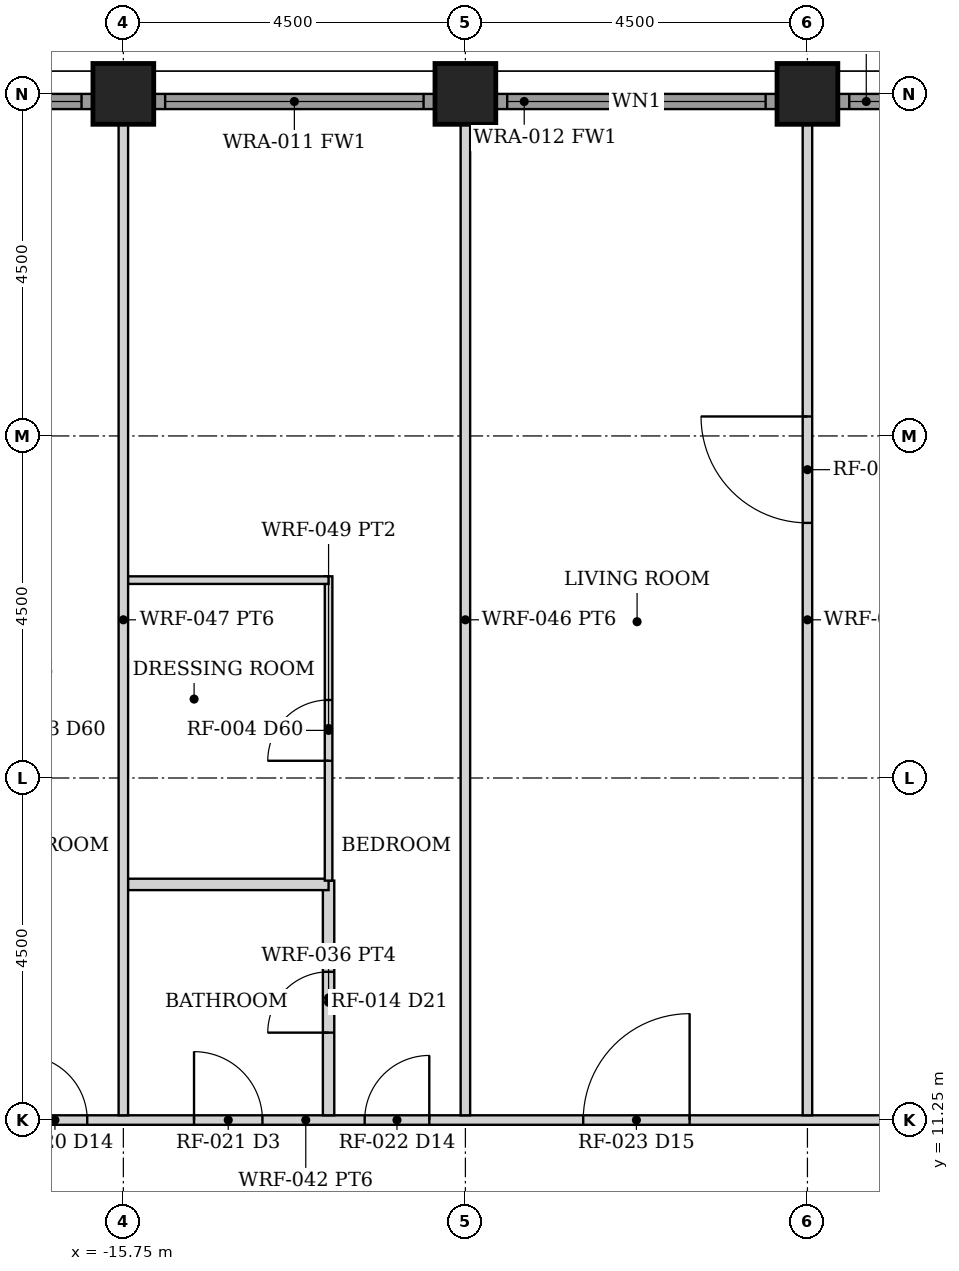
"""IFC4 building model, lengths in metres.
Left out: names, types, materials, properties, quantities, classifications, styles, units other than length and angle.
Written with IfcOpenShell. Run it as: python <this file> out.ifc"""

import sys

from ifc_helpers import new_model, si_unit, direction, frame, frame_2d, origin, origin_2d, place, context, subcontext, project, spatial, rectangle, hollow_rectangle, extrude, element, fill, save


model = new_model("IFC4")
c1 = context("Model", 3, precision=1e-05, world=origin(), true_north=direction((0.0, 1.0)))
c2 = subcontext(c1, "Body", "Model", "MODEL_VIEW")
j1 = project(units=[si_unit("LENGTHUNIT", "METRE"), si_unit("PLANEANGLEUNIT", "RADIAN")], contexts=[c1])
p1 = place(None, origin())
s1 = spatial("IfcSite", under=j1, at=p1, CompositionType="ELEMENT")
p2 = place(p1, origin())
s2 = spatial("IfcBuilding", under=s1, at=p2, CompositionType="ELEMENT")
p3 = place(p2, frame((0.0, 0.0, 79.0)))
s3 = spatial("IfcBuildingStorey", under=s2, at=p3, CompositionType="ELEMENT", Elevation=79.0)
for number, where, z_axis, x_axis in (
    (1, (-15.75, 24.75, 0.0), (0.0, 0.0, 1.0), (0.0, 1.0, 0.0)),
    (2, (-11.25, 24.75, 0.0), (0.0, 0.0, 1.0), (0.0, 1.0, 0.0)),
    (3, (-6.75, 24.75, 0.0), (0.0, 0.0, 1.0), (0.0, 1.0, 0.0)),
):
    element("IfcColumn", number, at=place(p3, frame(where, z_axis=z_axis, x_axis=x_axis)), inside=s3, PredefinedType="COLUMN", context=c2, shape_type="SweptSolid", body=[
        extrude(hollow_rectangle(XDim=0.8, YDim=0.8, WallThickness=0.06, at=origin_2d()), origin(), (0.0, 0.0, 1.0), 3.5),
    ])
p4 = place(p3, frame((-19.845, 24.65, 0.0), z_axis=(0.0, 0.0, 1.0), x_axis=(1.0, 0.0, 0.0)))
e4 = element("IfcWall", 4, at=p4, inside=s3, PredefinedType="SOLIDWALL", context=c2, shape_type="SweptSolid", body=[
    extrude(rectangle(XDim=3.69, YDim=0.2, at=frame_2d((1.845, 0.0))), origin(), (0.0, 0.0, 1.0), 2.379),
])
p5 = place(p4, frame((0.145, 0.0, 0.3)))
e5 = element("IfcOpeningElement", 5, at=p5, cuts=e4, PredefinedType="OPENING", context=c2, shape_type="SweptSolid", body=[
    extrude(rectangle(XDim=3.4, YDim=1.929, at=frame_2d((1.7, 0.964))), frame((0.0, 0.11, 0.0), z_axis=(0.0, -1.0, 0.0), x_axis=(1.0, 0.0, 0.0)), (0.0, 0.0, 1.0), 0.22),
])
p6 = place(p3, frame((-15.345, 24.65, 0.0), z_axis=(0.0, 0.0, 1.0), x_axis=(1.0, 0.0, 0.0)))
e6 = element("IfcWall", 6, at=p6, inside=s3, PredefinedType="SOLIDWALL", context=c2, shape_type="SweptSolid", body=[
    extrude(rectangle(XDim=3.69, YDim=0.2, at=frame_2d((1.845, 0.0))), origin(), (0.0, 0.0, 1.0), 2.379),
])
p7 = place(p6, frame((0.145, 0.0, 0.3)))
e7 = element("IfcOpeningElement", 7, at=p7, cuts=e6, PredefinedType="OPENING", context=c2, shape_type="SweptSolid", body=[
    extrude(rectangle(XDim=3.4, YDim=1.929, at=frame_2d((1.7, 0.964))), frame((0.0, 0.11, 0.0), z_axis=(0.0, -1.0, 0.0), x_axis=(1.0, 0.0, 0.0)), (0.0, 0.0, 1.0), 0.22),
])
p8 = place(p3, frame((-10.845, 24.65, 0.0), z_axis=(0.0, 0.0, 1.0), x_axis=(1.0, 0.0, 0.0)))
e8 = element("IfcWall", 8, at=p8, inside=s3, PredefinedType="SOLIDWALL", context=c2, shape_type="SweptSolid", body=[
    extrude(rectangle(XDim=3.69, YDim=0.2, at=frame_2d((1.845, 0.0))), origin(), (0.0, 0.0, 1.0), 2.379),
])
p9 = place(p8, frame((0.145, 0.0, 0.3)))
e9 = element("IfcOpeningElement", 9, at=p9, cuts=e8, PredefinedType="OPENING", context=c2, shape_type="SweptSolid", body=[
    extrude(rectangle(XDim=3.4, YDim=1.929, at=frame_2d((1.7, 0.964))), frame((0.0, 0.11, 0.0), z_axis=(0.0, -1.0, 0.0), x_axis=(1.0, 0.0, 0.0)), (0.0, 0.0, 1.0), 0.22),
])
p10 = place(p3, frame((-6.345, 24.65, 0.0), z_axis=(0.0, 0.0, 1.0), x_axis=(1.0, 0.0, 0.0)))
e10 = element("IfcWall", 10, at=p10, inside=s3, PredefinedType="SOLIDWALL", context=c2, shape_type="SweptSolid", body=[
    extrude(rectangle(XDim=3.69, YDim=0.2, at=frame_2d((1.845, 0.0))), origin(), (0.0, 0.0, 1.0), 2.379),
])
p11 = place(p10, frame((0.145, 0.0, 0.3)))
e11 = element("IfcOpeningElement", 11, at=p11, cuts=e10, PredefinedType="OPENING", context=c2, shape_type="SweptSolid", body=[
    extrude(rectangle(XDim=3.4, YDim=1.929, at=frame_2d((1.7, 0.964))), frame((0.0, 0.11, 0.0), z_axis=(0.0, -1.0, 0.0), x_axis=(1.0, 0.0, 0.0)), (0.0, 0.0, 1.0), 0.22),
])
p12 = place(p3, frame((-24.35, 11.25, 0.0), z_axis=(0.0, 0.0, 1.0), x_axis=(1.0, 0.0, 0.0)))
e12 = element("IfcWall", 12, at=p12, inside=s3, PredefinedType="PARTITIONING", context=c2, shape_type="SweptSolid", body=[
    extrude(rectangle(XDim=22.0, YDim=0.125, at=frame_2d((11.0, 0.0))), origin(), (0.0, 0.0, 1.0), 2.373),
])
p13 = place(p12, frame((20.25, 0.0, 0.0)))
e13 = element("IfcOpeningElement", 13, at=p13, cuts=e12, PredefinedType="OPENING", context=c2, shape_type="SweptSolid", body=[
    extrude(rectangle(XDim=0.9, YDim=2.1, at=frame_2d((0.45, 1.05))), frame((0.0, 0.073, 0.0), z_axis=(0.0, -1.0, 0.0), x_axis=(1.0, 0.0, 0.0)), (0.0, 0.0, 1.0), 0.145),
])
p14 = place(p12, frame((14.65, 0.0, 0.0)))
e14 = element("IfcOpeningElement", 14, at=p14, cuts=e12, PredefinedType="OPENING", context=c2, shape_type="SweptSolid", body=[
    extrude(rectangle(XDim=1.4, YDim=2.1, at=frame_2d((0.7, 1.05))), frame((0.0, 0.073, 0.0), z_axis=(0.0, -1.0, 0.0), x_axis=(1.0, 0.0, 0.0)), (0.0, 0.0, 1.0), 0.145),
])
p15 = place(p12, frame((11.775, 0.0, 0.0)))
e15 = element("IfcOpeningElement", 15, at=p15, cuts=e12, PredefinedType="OPENING", context=c2, shape_type="SweptSolid", body=[
    extrude(rectangle(XDim=0.85, YDim=2.1, at=frame_2d((0.425, 1.05))), frame((0.0, 0.073, 0.0), z_axis=(0.0, -1.0, 0.0), x_axis=(1.0, 0.0, 0.0)), (0.0, 0.0, 1.0), 0.145),
])
p16 = place(p12, frame((9.53, 0.0, 0.0)))
e16 = element("IfcOpeningElement", 16, at=p16, cuts=e12, PredefinedType="OPENING", context=c2, shape_type="SweptSolid", body=[
    extrude(rectangle(XDim=0.9, YDim=2.1, at=frame_2d((0.45, 1.05))), frame((0.0, 0.073, 0.0), z_axis=(0.0, -1.0, 0.0), x_axis=(1.0, 0.0, 0.0)), (0.0, 0.0, 1.0), 0.145),
])
p17 = place(p12, frame((7.275, 0.0, 0.0)))
e17 = element("IfcOpeningElement", 17, at=p17, cuts=e12, PredefinedType="OPENING", context=c2, shape_type="SweptSolid", body=[
    extrude(rectangle(XDim=0.85, YDim=2.1, at=frame_2d((0.425, 1.05))), frame((0.0, 0.073, 0.0), z_axis=(0.0, -1.0, 0.0), x_axis=(1.0, 0.0, 0.0)), (0.0, 0.0, 1.0), 0.145),
])
p18 = place(p12, frame((2.775, 0.0, 0.0)))
e18 = element("IfcOpeningElement", 18, at=p18, cuts=e12, PredefinedType="OPENING", context=c2, shape_type="SweptSolid", body=[
    extrude(rectangle(XDim=0.85, YDim=2.1, at=frame_2d((0.425, 1.05))), frame((0.0, 0.073, 0.0), z_axis=(0.0, -1.0, 0.0), x_axis=(1.0, 0.0, 0.0)), (0.0, 0.0, 1.0), 0.145),
])
p19 = place(p3, frame((-6.75, 11.312, 0.0), z_axis=(0.0, 0.0, 1.0), x_axis=(0.0, 1.0, 0.0)))
e19 = element("IfcWall", 19, at=p19, inside=s3, PredefinedType="PARTITIONING", context=c2, shape_type="SweptSolid", body=[
    extrude(rectangle(XDim=13.038, YDim=0.125, at=frame_2d((6.519, 0.0))), origin(), (0.0, 0.0, 1.0), 2.373),
])
p20 = place(p19, frame((7.794, 0.0, 0.0)))
e20 = element("IfcOpeningElement", 20, at=p20, cuts=e19, PredefinedType="OPENING", context=c2, shape_type="SweptSolid", body=[
    extrude(rectangle(XDim=1.4, YDim=2.1, at=frame_2d((0.7, 1.05))), frame((0.0, 0.073, 0.0), z_axis=(0.0, -1.0, 0.0), x_axis=(1.0, 0.0, 0.0)), (0.0, 0.0, 1.0), 0.145),
])
p21 = place(p3, frame((-11.25, 11.312, 0.0), z_axis=(0.0, 0.0, 1.0), x_axis=(0.0, 1.0, 0.0)))
e21 = element("IfcWall", 21, at=p21, inside=s3, PredefinedType="PARTITIONING", context=c2, shape_type="SweptSolid", body=[
    extrude(rectangle(XDim=13.038, YDim=0.125, at=frame_2d((6.519, 0.0))), origin(), (0.0, 0.0, 1.0), 2.373),
])
p22 = place(p3, frame((-13.05, 11.312, 0.0), z_axis=(0.0, 0.0, 1.0), x_axis=(0.0, 1.0, 0.0)))
e22 = element("IfcWall", 22, at=p22, inside=s3, PredefinedType="PARTITIONING", context=c2, shape_type="SweptSolid", body=[
    extrude(rectangle(XDim=3.087, YDim=0.15, at=frame_2d((1.544, 0.0))), origin(), (0.0, 0.0, 1.0), 2.373),
])
p23 = place(p22, frame((1.087, 0.0, 0.0)))
e23 = element("IfcOpeningElement", 23, at=p23, cuts=e22, PredefinedType="OPENING", context=c2, shape_type="SweptSolid", body=[
    extrude(rectangle(XDim=0.8, YDim=2.1, at=frame_2d((0.4, 1.05))), frame((0.0, 0.085, 0.0), z_axis=(0.0, -1.0, 0.0), x_axis=(1.0, 0.0, 0.0)), (0.0, 0.0, 1.0), 0.17),
])
p24 = place(p3, frame((-15.69, 14.35, 0.0), z_axis=(0.0, 0.0, 1.0), x_axis=(1.0, 0.0, 0.0)))
e24 = element("IfcWall", 24, at=p24, inside=s3, PredefinedType="PARTITIONING", context=c2, shape_type="SweptSolid", body=[
    extrude(rectangle(XDim=2.64, YDim=0.15, at=frame_2d((1.32, 0.0))), origin(), (0.0, 0.0, 1.0), 2.373),
])
p25 = place(p3, frame((-13.05, 14.4, 0.0), z_axis=(0.0, 0.0, 1.0), x_axis=(0.0, 1.0, 0.0)))
e25 = element("IfcWall", 25, at=p25, inside=s3, PredefinedType="PARTITIONING", context=c2, shape_type="SweptSolid", body=[
    extrude(rectangle(XDim=4.003, YDim=0.1, at=frame_2d((2.001, 0.0))), origin(), (0.0, 0.0, 1.0), 2.373),
])
p26 = place(p25, frame((1.576, 0.0, 0.0)))
e26 = element("IfcOpeningElement", 26, at=p26, cuts=e25, PredefinedType="OPENING", context=c2, shape_type="SweptSolid", body=[
    extrude(rectangle(XDim=0.8, YDim=2.1, at=frame_2d((0.4, 1.05))), frame((0.0, 0.06, 0.0), z_axis=(0.0, -1.0, 0.0), x_axis=(1.0, 0.0, 0.0)), (0.0, 0.0, 1.0), 0.12),
])
p27 = place(p3, frame((-15.69, 18.353, 0.0), z_axis=(0.0, 0.0, 1.0), x_axis=(1.0, 0.0, 0.0)))
e27 = element("IfcWall", 27, at=p27, inside=s3, PredefinedType="PARTITIONING", context=c2, shape_type="SweptSolid", body=[
    extrude(rectangle(XDim=2.64, YDim=0.1, at=frame_2d((1.32, 0.0))), origin(), (0.0, 0.0, 1.0), 2.373),
])
p28 = place(p3, frame((-15.75, 11.312, 0.0), z_axis=(0.0, 0.0, 1.0), x_axis=(0.0, 1.0, 0.0)))
e28 = element("IfcWall", 28, at=p28, inside=s3, PredefinedType="PARTITIONING", context=c2, shape_type="SweptSolid", body=[
    extrude(rectangle(XDim=13.038, YDim=0.125, at=frame_2d((6.519, 0.0))), origin(), (0.0, 0.0, 1.0), 2.373),
])
p29 = place(p5, origin())
e29 = element("IfcWindow", 29, at=p29, inside=s3, PartitioningType="SINGLE_PANEL", PredefinedType="WINDOW", context=c2, shape_type="SweptSolid", body=[
    extrude(rectangle(XDim=3.4, YDim=1.929, at=frame_2d((1.7, 0.964))), frame((0.0, 0.03, 0.0), z_axis=(0.0, -1.0, 0.0), x_axis=(1.0, 0.0, 0.0)), (0.0, 0.0, 1.0), 0.06),
])
fill(e5, e29)
p30 = place(p7, origin())
e30 = element("IfcWindow", 30, at=p30, inside=s3, PartitioningType="SINGLE_PANEL", PredefinedType="WINDOW", context=c2, shape_type="SweptSolid", body=[
    extrude(rectangle(XDim=3.4, YDim=1.929, at=frame_2d((1.7, 0.964))), frame((0.0, 0.03, 0.0), z_axis=(0.0, -1.0, 0.0), x_axis=(1.0, 0.0, 0.0)), (0.0, 0.0, 1.0), 0.06),
])
fill(e7, e30)
p31 = place(p9, origin())
e31 = element("IfcWindow", 31, at=p31, inside=s3, PartitioningType="SINGLE_PANEL", PredefinedType="WINDOW", context=c2, shape_type="SweptSolid", body=[
    extrude(rectangle(XDim=3.4, YDim=1.929, at=frame_2d((1.7, 0.964))), frame((0.0, 0.03, 0.0), z_axis=(0.0, -1.0, 0.0), x_axis=(1.0, 0.0, 0.0)), (0.0, 0.0, 1.0), 0.06),
])
fill(e9, e31)
p32 = place(p11, origin())
e32 = element("IfcWindow", 32, at=p32, inside=s3, PartitioningType="SINGLE_PANEL", PredefinedType="WINDOW", context=c2, shape_type="SweptSolid", body=[
    extrude(rectangle(XDim=3.4, YDim=1.929, at=frame_2d((1.7, 0.964))), frame((0.0, 0.03, 0.0), z_axis=(0.0, -1.0, 0.0), x_axis=(1.0, 0.0, 0.0)), (0.0, 0.0, 1.0), 0.06),
])
fill(e11, e32)
p33 = place(p14, origin())
e33 = element("IfcDoor", 33, at=p33, inside=s3, OperationType="SINGLE_SWING_RIGHT", PredefinedType="DOOR", context=c2, shape_type="SweptSolid", body=[
    extrude(rectangle(XDim=1.4, YDim=2.1, at=frame_2d((0.7, 1.05))), frame((0.0, 0.025, 0.0), z_axis=(0.0, -1.0, 0.0), x_axis=(1.0, 0.0, 0.0)), (0.0, 0.0, 1.0), 0.05),
])
fill(e14, e33)
p34 = place(p20, origin())
e34 = element("IfcDoor", 34, at=p34, inside=s3, OperationType="SINGLE_SWING_RIGHT", PredefinedType="DOOR", context=c2, shape_type="SweptSolid", body=[
    extrude(rectangle(XDim=1.4, YDim=2.1, at=frame_2d((0.7, 1.05))), frame((0.0, 0.025, 0.0), z_axis=(0.0, -1.0, 0.0), x_axis=(1.0, 0.0, 0.0)), (0.0, 0.0, 1.0), 0.05),
])
fill(e20, e34)
p35 = place(p15, origin())
e35 = element("IfcDoor", 35, at=p35, inside=s3, OperationType="SINGLE_SWING_RIGHT", PredefinedType="DOOR", context=c2, shape_type="SweptSolid", body=[
    extrude(rectangle(XDim=0.85, YDim=2.1, at=frame_2d((0.425, 1.05))), frame((0.0, 0.025, 0.0), z_axis=(0.0, -1.0, 0.0), x_axis=(1.0, 0.0, 0.0)), (0.0, 0.0, 1.0), 0.05),
])
fill(e15, e35)
p36 = place(p23, origin())
e36 = element("IfcDoor", 36, at=p36, inside=s3, OperationType="SINGLE_SWING_LEFT", PredefinedType="DOOR", context=c2, shape_type="SweptSolid", body=[
    extrude(rectangle(XDim=0.8, YDim=2.1, at=frame_2d((0.4, 1.05))), frame((0.0, 0.025, 0.0), z_axis=(0.0, -1.0, 0.0), x_axis=(1.0, 0.0, 0.0)), (0.0, 0.0, 1.0), 0.05),
])
fill(e23, e36)
p37 = place(p16, origin())
e37 = element("IfcDoor", 37, at=p37, inside=s3, OperationType="SINGLE_SWING_LEFT", PredefinedType="DOOR", context=c2, shape_type="SweptSolid", body=[
    extrude(rectangle(XDim=0.9, YDim=2.1, at=frame_2d((0.45, 1.05))), frame((0.0, 0.025, 0.0), z_axis=(0.0, -1.0, 0.0), x_axis=(1.0, 0.0, 0.0)), (0.0, 0.0, 1.0), 0.05),
])
fill(e16, e37)
p38 = place(p26, origin())
e38 = element("IfcDoor", 38, at=p38, inside=s3, OperationType="SINGLE_SWING_LEFT", PredefinedType="DOOR", context=c2, shape_type="SweptSolid", body=[
    extrude(rectangle(XDim=0.8, YDim=2.1, at=frame_2d((0.4, 1.05))), frame((0.0, 0.025, 0.0), z_axis=(0.0, -1.0, 0.0), x_axis=(1.0, 0.0, 0.0)), (0.0, 0.0, 1.0), 0.05),
])
fill(e26, e38)
p39 = place(p17, origin())
e39 = element("IfcDoor", 39, at=p39, inside=s3, OperationType="SINGLE_SWING_LEFT", PredefinedType="DOOR", context=c2, shape_type="SweptSolid", body=[
    extrude(rectangle(XDim=0.85, YDim=2.1, at=frame_2d((0.425, 1.05))), frame((0.0, 0.025, 0.0), z_axis=(0.0, -1.0, 0.0), x_axis=(1.0, 0.0, 0.0)), (0.0, 0.0, 1.0), 0.05),
])
fill(e17, e39)
save(model, sys.argv[1])
